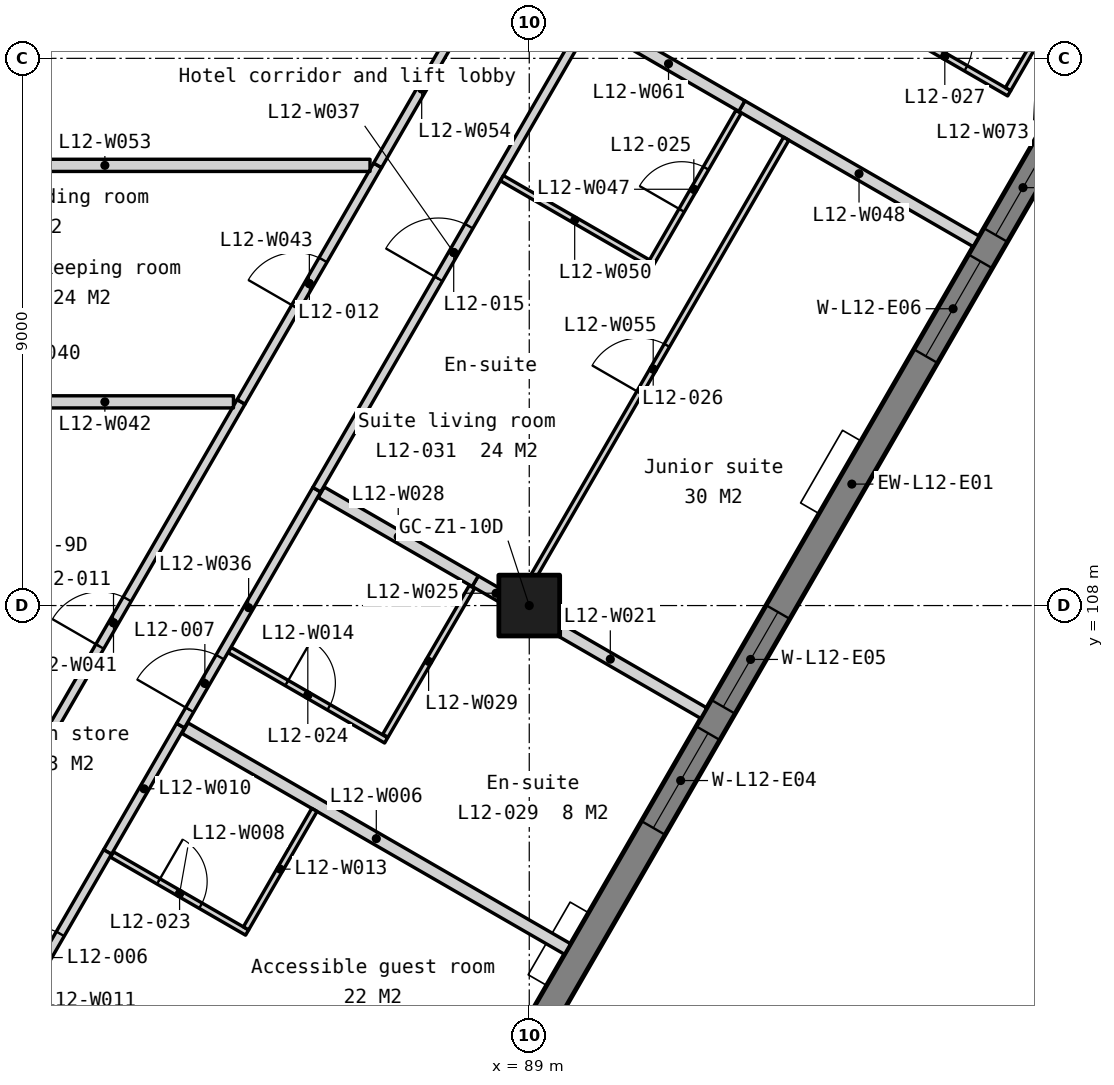
"""IFC4 building model, lengths in metres.
Left out: names, types, materials, properties, quantities, classifications, styles, units other than length and angle.
Written with IfcOpenShell. Run it as: python <this file> out.ifc"""

import sys

from ifc_helpers import new_model, si_unit, direction, frame, frame_2d, origin, origin_2d, place, context, subcontext, project, spatial, polyline, rectangle, outline, extrude, element, fill, save


model = new_model("IFC4")
c1 = context("Model", 3, precision=1e-05, world=origin(), true_north=direction((0.0, 1.0)))
c2 = subcontext(c1, "Body", "Model", "MODEL_VIEW")
j1 = project(units=[si_unit("LENGTHUNIT", "METRE"), si_unit("PLANEANGLEUNIT", "RADIAN")], contexts=[c1])
p1 = place(None, origin())
s1 = spatial("IfcSite", under=j1, at=p1, CompositionType="ELEMENT")
p2 = place(p1, origin())
s2 = spatial("IfcBuilding", under=s1, at=p2, CompositionType="ELEMENT")
p3 = place(p2, frame((0.0, 0.0, 56.0)))
s3 = spatial("IfcBuildingStorey", under=s2, at=p3, CompositionType="ELEMENT", Elevation=56.0)
p4 = place(p3, frame((89.0, 108.0, 0.0), z_axis=(0.0, 0.0, 1.0), x_axis=(1.0, 0.0, 0.0)))
e1 = element("IfcColumn", 1, at=p4, inside=s3, PredefinedType="COLUMN", context=c2, shape_type="SweptSolid", body=[
    extrude(rectangle(XDim=1.0, YDim=1.0, at=origin_2d()), origin(), (0.0, 0.0, 1.0), 3.5),
])
p5 = place(p3, frame((83.105, 90.599, -0.15), z_axis=(0.0, 0.0, 1.0), x_axis=(0.499999201451, 0.866025864826, 0.0)))
e2 = element("IfcWall", 2, at=p5, inside=s3, PredefinedType="SOLIDWALL", context=c2, shape_type="SweptSolid", body=[
    extrude(outline(polyline([(44.8, 0.0), (44.8, 3.5), (0.0, 3.5), (0.0, 0.0), (44.8, 0.0)])), frame((0.0, 0.225, 0.0), z_axis=(0.0, -1.0, 0.0), x_axis=(1.0, 0.0, 0.0)), (0.0, 0.0, 1.0), 0.45),
])
p6 = place(p5, frame((0.786, 0.0, 1.05)))
e3 = element("IfcOpeningElement", 3, at=p6, cuts=e2, PredefinedType="OPENING", context=c2, shape_type="SweptSolid", body=[
    extrude(rectangle(XDim=1.2, YDim=1.5, at=frame_2d((0.6, 0.75))), frame((0.0, 0.235, 0.0), z_axis=(0.0, -1.0, 0.0), x_axis=(1.0, 0.0, 0.0)), (0.0, 0.0, 1.0), 0.47),
])
p7 = place(p5, frame((6.91, 0.0, 1.05)))
e4 = element("IfcOpeningElement", 4, at=p7, cuts=e2, PredefinedType="OPENING", context=c2, shape_type="SweptSolid", body=[
    extrude(rectangle(XDim=1.8, YDim=1.5, at=frame_2d((0.9, 0.75))), frame((0.0, 0.235, 0.0), z_axis=(0.0, -1.0, 0.0), x_axis=(1.0, 0.0, 0.0)), (0.0, 0.0, 1.0), 0.47),
])
p8 = place(p5, frame((9.21, 0.0, 1.05)))
e5 = element("IfcOpeningElement", 5, at=p8, cuts=e2, PredefinedType="OPENING", context=c2, shape_type="SweptSolid", body=[
    extrude(rectangle(XDim=1.8, YDim=1.5, at=frame_2d((0.9, 0.75))), frame((0.0, 0.235, 0.0), z_axis=(0.0, -1.0, 0.0), x_axis=(1.0, 0.0, 0.0)), (0.0, 0.0, 1.0), 0.47),
])
p9 = place(p5, frame((15.87, 0.0, 1.05)))
e6 = element("IfcOpeningElement", 6, at=p9, cuts=e2, PredefinedType="OPENING", context=c2, shape_type="SweptSolid", body=[
    extrude(rectangle(XDim=1.8, YDim=1.5, at=frame_2d((0.9, 0.75))), frame((0.0, 0.235, 0.0), z_axis=(0.0, -1.0, 0.0), x_axis=(1.0, 0.0, 0.0)), (0.0, 0.0, 1.0), 0.47),
])
p10 = place(p5, frame((18.17, 0.0, 1.05)))
e7 = element("IfcOpeningElement", 7, at=p10, cuts=e2, PredefinedType="OPENING", context=c2, shape_type="SweptSolid", body=[
    extrude(rectangle(XDim=1.8, YDim=1.5, at=frame_2d((0.9, 0.75))), frame((0.0, 0.235, 0.0), z_axis=(0.0, -1.0, 0.0), x_axis=(1.0, 0.0, 0.0)), (0.0, 0.0, 1.0), 0.47),
])
p11 = place(p5, frame((24.83, 0.0, 1.05)))
e8 = element("IfcOpeningElement", 8, at=p11, cuts=e2, PredefinedType="OPENING", context=c2, shape_type="SweptSolid", body=[
    extrude(rectangle(XDim=1.8, YDim=1.5, at=frame_2d((0.9, 0.75))), frame((0.0, 0.235, 0.0), z_axis=(0.0, -1.0, 0.0), x_axis=(1.0, 0.0, 0.0)), (0.0, 0.0, 1.0), 0.47),
])
p12 = place(p5, frame((27.13, 0.0, 1.05)))
e9 = element("IfcOpeningElement", 9, at=p12, cuts=e2, PredefinedType="OPENING", context=c2, shape_type="SweptSolid", body=[
    extrude(rectangle(XDim=1.8, YDim=1.5, at=frame_2d((0.9, 0.75))), frame((0.0, 0.235, 0.0), z_axis=(0.0, -1.0, 0.0), x_axis=(1.0, 0.0, 0.0)), (0.0, 0.0, 1.0), 0.47),
])
p13 = place(p5, frame((33.79, 0.0, 1.05)))
e10 = element("IfcOpeningElement", 10, at=p13, cuts=e2, PredefinedType="OPENING", context=c2, shape_type="SweptSolid", body=[
    extrude(rectangle(XDim=1.8, YDim=1.5, at=frame_2d((0.9, 0.75))), frame((0.0, 0.235, 0.0), z_axis=(0.0, -1.0, 0.0), x_axis=(1.0, 0.0, 0.0)), (0.0, 0.0, 1.0), 0.47),
])
p14 = place(p5, frame((36.09, 0.0, 1.05)))
e11 = element("IfcOpeningElement", 11, at=p14, cuts=e2, PredefinedType="OPENING", context=c2, shape_type="SweptSolid", body=[
    extrude(rectangle(XDim=1.8, YDim=1.5, at=frame_2d((0.9, 0.75))), frame((0.0, 0.235, 0.0), z_axis=(0.0, -1.0, 0.0), x_axis=(1.0, 0.0, 0.0)), (0.0, 0.0, 1.0), 0.47),
])
p15 = place(p5, frame((42.814, 0.0, 1.05)))
e12 = element("IfcOpeningElement", 12, at=p15, cuts=e2, PredefinedType="OPENING", context=c2, shape_type="SweptSolid", body=[
    extrude(rectangle(XDim=1.2, YDim=1.5, at=frame_2d((0.6, 0.75))), frame((0.0, 0.235, 0.0), z_axis=(0.0, -1.0, 0.0), x_axis=(1.0, 0.0, 0.0)), (0.0, 0.0, 1.0), 0.47),
])
p16 = place(p3, frame((83.339, 105.983, 0.0), z_axis=(0.0, 0.0, 1.0), x_axis=(0.866023858256, -0.500002676924, 0.0)))
e13 = element("IfcWall", 13, at=p16, inside=s3, PredefinedType="PARTITIONING", context=c2, shape_type="SweptSolid", body=[
    extrude(rectangle(XDim=7.265, YDim=0.2, at=frame_2d((3.633, 0.0))), origin(), (0.0, 0.0, 1.0), 3.35),
])
p17 = place(p3, frame((82.139, 103.905, 0.0), z_axis=(0.0, 0.0, 1.0), x_axis=(0.866014388206, -0.500019079056, 0.0)))
e14 = element("IfcWall", 14, at=p17, inside=s3, PredefinedType="PARTITIONING", context=c2, shape_type="SweptSolid", body=[
    extrude(rectangle(XDim=2.565, YDim=0.1, at=frame_2d((1.282, 0.0))), origin(), (0.0, 0.0, 1.0), 3.35),
])
p18 = place(p17, frame((0.883, 0.0, 0.0)))
e15 = element("IfcOpeningElement", 15, at=p18, cuts=e14, PredefinedType="OPENING", context=c2, shape_type="SweptSolid", body=[
    extrude(rectangle(XDim=0.8, YDim=2.1, at=frame_2d((0.4, 1.05))), frame((0.0, 0.06, 0.0), z_axis=(0.0, -1.0, 0.0), x_axis=(1.0, 0.0, 0.0)), (0.0, 0.0, 1.0), 0.12),
])
p19 = place(p3, frame((82.065, 103.947, 0.0), z_axis=(0.0, 0.0, 1.0), x_axis=(0.500001309137, 0.866024647952, 0.0)))
e16 = element("IfcWall", 16, at=p19, inside=s3, PredefinedType="PARTITIONING", context=c2, shape_type="SweptSolid", body=[
    extrude(rectangle(XDim=2.4, YDim=0.15, at=frame_2d((1.2, 0.0))), origin(), (0.0, 0.0, 1.0), 3.35),
])
p20 = place(p3, frame((80.06, 100.474, 0.0), z_axis=(0.0, 0.0, 1.0), x_axis=(0.499963124258, 0.866046692957, 0.0)))
e17 = element("IfcWall", 17, at=p20, inside=s3, PredefinedType="PARTITIONING", context=c2, shape_type="SweptSolid", body=[
    extrude(rectangle(XDim=4.01, YDim=0.15, at=frame_2d((2.005, 0.0))), origin(), (0.0, 0.0, 1.0), 3.35),
])
p21 = place(p20, frame((1.555, 0.0, 0.0)))
e18 = element("IfcOpeningElement", 18, at=p21, cuts=e17, PredefinedType="OPENING", context=c2, shape_type="SweptSolid", body=[
    extrude(rectangle(XDim=0.9, YDim=2.1, at=frame_2d((0.45, 1.05))), frame((0.0, 0.085, 0.0), z_axis=(0.0, -1.0, 0.0), x_axis=(1.0, 0.0, 0.0)), (0.0, 0.0, 1.0), 0.17),
])
p22 = place(p3, frame((84.342, 102.69, 0.0), z_axis=(0.0, 0.0, 1.0), x_axis=(0.499966648284, 0.866044658551, 0.0)))
e19 = element("IfcWall", 19, at=p22, inside=s3, PredefinedType="PARTITIONING", context=c2, shape_type="SweptSolid", body=[
    extrude(rectangle(XDim=2.25, YDim=0.1, at=frame_2d((1.125, 0.0))), origin(), (0.0, 0.0, 1.0), 3.35),
])
p23 = place(p3, frame((84.07, 107.27, 0.0), z_axis=(0.0, 0.0, 1.0), x_axis=(0.866053027861, -0.499952150643, 0.0)))
e20 = element("IfcWall", 20, at=p23, inside=s3, PredefinedType="PARTITIONING", context=c2, shape_type="SweptSolid", body=[
    extrude(rectangle(XDim=2.975, YDim=0.1, at=frame_2d((1.487, 0.0))), origin(), (0.0, 0.0, 1.0), 3.35),
])
p24 = place(p23, frame((1.087, 0.0, 0.0)))
e21 = element("IfcOpeningElement", 21, at=p24, cuts=e20, PredefinedType="OPENING", context=c2, shape_type="SweptSolid", body=[
    extrude(rectangle(XDim=0.8, YDim=2.1, at=frame_2d((0.4, 1.05))), frame((0.0, 0.06, 0.0), z_axis=(0.0, -1.0, 0.0), x_axis=(1.0, 0.0, 0.0)), (0.0, 0.0, 1.0), 0.12),
])
p25 = place(p3, frame((88.796, 108.005, 0.0), z_axis=(0.0, 0.0, 1.0), x_axis=(0.8660424351, -0.499970499736, 0.0)))
e22 = element("IfcWall", 22, at=p25, inside=s3, PredefinedType="PARTITIONING", context=c2, shape_type="SweptSolid", body=[
    extrude(rectangle(XDim=3.55, YDim=0.2, at=frame_2d((1.775, 0.0))), origin(), (0.0, 0.0, 1.0), 3.35),
])
p26 = place(p3, frame((88.112, 108.4, 0.0), z_axis=(0.0, 0.0, 1.0), x_axis=(0.865989998118, -0.500061319399, 0.0)))
e23 = element("IfcWall", 23, at=p26, inside=s3, PredefinedType="PARTITIONING", context=c2, shape_type="SweptSolid", body=[
    extrude(rectangle(XDim=0.79, YDim=0.2, at=frame_2d((0.395, 0.0))), origin(), (0.0, 0.0, 1.0), 3.35),
])
p27 = place(p3, frame((85.579, 109.863, 0.0), z_axis=(0.0, 0.0, 1.0), x_axis=(0.86601045545, -0.500025890382, 0.0)))
e24 = element("IfcWall", 24, at=p27, inside=s3, PredefinedType="PARTITIONING", context=c2, shape_type="SweptSolid", body=[
    extrude(rectangle(XDim=2.925, YDim=0.2, at=frame_2d((1.462, 0.0))), origin(), (0.0, 0.0, 1.0), 3.35),
])
p28 = place(p3, frame((86.633, 105.859, 0.0), z_axis=(0.0, 0.0, 1.0), x_axis=(0.502878343763, 0.864357201263, 0.0)))
e25 = element("IfcWall", 25, at=p28, inside=s3, PredefinedType="PARTITIONING", context=c2, shape_type="SweptSolid", body=[
    extrude(rectangle(XDim=2.83, YDim=0.1, at=frame_2d((1.415, 0.0))), origin(), (0.0, 0.0, 1.0), 3.35),
])
p29 = place(p3, frame((83.265, 106.026, 0.0), z_axis=(0.0, 0.0, 1.0), x_axis=(0.499989762656, 0.866031314237, 0.0)))
e26 = element("IfcWall", 26, at=p29, inside=s3, PredefinedType="PARTITIONING", context=c2, shape_type="SweptSolid", body=[
    extrude(rectangle(XDim=4.48, YDim=0.15, at=frame_2d((2.24, 0.0))), origin(), (0.0, 0.0, 1.0), 3.35),
])
p30 = place(p29, frame((0.3, 0.0, 0.0)))
e27 = element("IfcOpeningElement", 27, at=p30, cuts=e26, PredefinedType="OPENING", context=c2, shape_type="SweptSolid", body=[
    extrude(rectangle(XDim=1.0, YDim=2.1, at=frame_2d((0.5, 1.05))), frame((0.0, 0.085, 0.0), z_axis=(0.0, -1.0, 0.0), x_axis=(1.0, 0.0, 0.0)), (0.0, 0.0, 1.0), 0.17),
])
p31 = place(p3, frame((85.505, 109.906, 0.0), z_axis=(0.0, 0.0, 1.0), x_axis=(0.500017993482, 0.866015014994, 0.0)))
e28 = element("IfcWall", 28, at=p31, inside=s3, PredefinedType="PARTITIONING", context=c2, shape_type="SweptSolid", body=[
    extrude(rectangle(XDim=9.01, YDim=0.15, at=frame_2d((4.505, 0.0))), origin(), (0.0, 0.0, 1.0), 3.35),
])
p32 = place(p31, frame((4.005, 0.0, 0.0)))
e29 = element("IfcOpeningElement", 29, at=p32, cuts=e28, PredefinedType="OPENING", context=c2, shape_type="SweptSolid", body=[
    extrude(rectangle(XDim=1.0, YDim=2.1, at=frame_2d((0.5, 1.05))), frame((0.0, 0.085, 0.0), z_axis=(0.0, -1.0, 0.0), x_axis=(1.0, 0.0, 0.0)), (0.0, 0.0, 1.0), 0.17),
])
p33 = place(p3, frame((80.065, 104.083, 0.0), z_axis=(0.0, 0.0, 1.0), x_axis=(0.49999109456, 0.866030545282, 0.0)))
e30 = element("IfcWall", 30, at=p33, inside=s3, PredefinedType="PARTITIONING", context=c2, shape_type="SweptSolid", body=[
    extrude(rectangle(XDim=8.391, YDim=0.15, at=frame_2d((4.196, 0.0))), origin(), (0.0, 0.0, 1.0), 3.35),
])
p34 = place(p33, frame((3.746, 0.0, 0.0)))
e31 = element("IfcOpeningElement", 31, at=p34, cuts=e30, PredefinedType="OPENING", context=c2, shape_type="SweptSolid", body=[
    extrude(rectangle(XDim=0.9, YDim=2.1, at=frame_2d((0.45, 1.05))), frame((0.0, 0.085, 0.0), z_axis=(0.0, -1.0, 0.0), x_axis=(1.0, 0.0, 0.0)), (0.0, 0.0, 1.0), 0.17),
])
p35 = place(p3, frame((79.906, 111.35, 0.0), z_axis=(0.0, 0.0, 1.0), x_axis=(1.0, 0.0, 0.0)))
e32 = element("IfcWall", 32, at=p35, inside=s3, PredefinedType="PARTITIONING", context=c2, shape_type="SweptSolid", body=[
    extrude(rectangle(XDim=4.229, YDim=0.2, at=frame_2d((2.115, 0.0))), origin(), (0.0, 0.0, 1.0), 3.35),
])
p36 = place(p3, frame((84.26, 111.35, 0.0), z_axis=(0.0, 0.0, 1.0), x_axis=(0.500003186274, 0.866023564181, 0.0)))
e33 = element("IfcWall", 33, at=p36, inside=s3, PredefinedType="PARTITIONING", context=c2, shape_type="SweptSolid", body=[
    extrude(rectangle(XDim=4.492, YDim=0.15, at=frame_2d((2.246, 0.0))), origin(), (0.0, 0.0, 1.0), 3.35),
])
p37 = place(p36, frame((1.796, 0.0, 0.0)))
e34 = element("IfcOpeningElement", 34, at=p37, cuts=e33, PredefinedType="OPENING", context=c2, shape_type="SweptSolid", body=[
    extrude(rectangle(XDim=0.9, YDim=2.1, at=frame_2d((0.45, 1.05))), frame((0.0, 0.085, 0.0), z_axis=(0.0, -1.0, 0.0), x_axis=(1.0, 0.0, 0.0)), (0.0, 0.0, 1.0), 0.17),
])
p38 = place(p3, frame((90.971, 113.574, 0.0), z_axis=(0.0, 0.0, 1.0), x_axis=(0.499988418424, 0.866032090307, 0.0)))
e35 = element("IfcWall", 35, at=p38, inside=s3, PredefinedType="PARTITIONING", context=c2, shape_type="SweptSolid", body=[
    extrude(rectangle(XDim=2.94, YDim=0.1, at=frame_2d((1.47, 0.0))), origin(), (0.0, 0.0, 1.0), 3.35),
])
p39 = place(p38, frame((1.07, 0.0, 0.0)))
e36 = element("IfcOpeningElement", 36, at=p39, cuts=e35, PredefinedType="OPENING", context=c2, shape_type="SweptSolid", body=[
    extrude(rectangle(XDim=0.8, YDim=2.1, at=frame_2d((0.4, 1.05))), frame((0.0, 0.06, 0.0), z_axis=(0.0, -1.0, 0.0), x_axis=(1.0, 0.0, 0.0)), (0.0, 0.0, 1.0), 0.12),
])
p40 = place(p3, frame((92.497, 116.215, 0.0), z_axis=(0.0, 0.0, 1.0), x_axis=(0.866012907634, -0.500021643343, 0.0)))
e37 = element("IfcWall", 37, at=p40, inside=s3, PredefinedType="PARTITIONING", context=c2, shape_type="SweptSolid", body=[
    extrude(rectangle(XDim=4.45, YDim=0.2, at=frame_2d((2.225, 0.0))), origin(), (0.0, 0.0, 1.0), 3.35),
])
p41 = place(p3, frame((88.55, 115.03, 0.0), z_axis=(0.0, 0.0, 1.0), x_axis=(0.866012076814, -0.50002308228, 0.0)))
e38 = element("IfcWall", 38, at=p41, inside=s3, PredefinedType="PARTITIONING", context=c2, shape_type="SweptSolid", body=[
    extrude(rectangle(XDim=2.765, YDim=0.1, at=frame_2d((1.382, 0.0))), origin(), (0.0, 0.0, 1.0), 3.35),
])
p42 = place(p3, frame((77.66, 115.24, 0.0), z_axis=(0.0, 0.0, 1.0), x_axis=(1.0, 0.0, 0.0)))
e39 = element("IfcWall", 39, at=p42, inside=s3, PredefinedType="PARTITIONING", context=c2, shape_type="SweptSolid", body=[
    extrude(rectangle(XDim=8.721, YDim=0.2, at=frame_2d((4.361, 0.0))), origin(), (0.0, 0.0, 1.0), 3.35),
])
p43 = place(p3, frame((86.506, 115.24, 0.0), z_axis=(0.0, 0.0, 1.0), x_axis=(0.500016544581, 0.866015851556, 0.0)))
e40 = element("IfcWall", 40, at=p43, inside=s3, PredefinedType="PARTITIONING", context=c2, shape_type="SweptSolid", body=[
    extrude(rectangle(XDim=2.898, YDim=0.15, at=frame_2d((1.449, 0.0))), origin(), (0.0, 0.0, 1.0), 3.35),
])
p44 = place(p3, frame((88.851, 108.101, 0.0), z_axis=(0.0, 0.0, 1.0), x_axis=(0.500004234368, 0.866022959057, 0.0)))
e41 = element("IfcWall", 41, at=p44, inside=s3, PredefinedType="PARTITIONING", context=c2, shape_type="SweptSolid", body=[
    extrude(rectangle(XDim=8.75, YDim=0.1, at=frame_2d((4.375, 0.0))), origin(), (0.0, 0.0, 1.0), 3.35),
])
p45 = place(p44, frame((3.925, 0.0, 0.0)))
e42 = element("IfcOpeningElement", 42, at=p45, cuts=e41, PredefinedType="OPENING", context=c2, shape_type="SweptSolid", body=[
    extrude(rectangle(XDim=0.9, YDim=2.1, at=frame_2d((0.45, 1.05))), frame((0.0, 0.06, 0.0), z_axis=(0.0, -1.0, 0.0), x_axis=(1.0, 0.0, 0.0)), (0.0, 0.0, 1.0), 0.12),
])
p46 = place(p3, frame((94.775, 117.647, 0.0), z_axis=(0.0, 0.0, 1.0), x_axis=(0.86604092097, -0.499973122483, 0.0)))
e43 = element("IfcWall", 43, at=p46, inside=s3, PredefinedType="PARTITIONING", context=c2, shape_type="SweptSolid", body=[
    extrude(rectangle(XDim=2.445, YDim=0.1, at=frame_2d((1.223, 0.0))), origin(), (0.0, 0.0, 1.0), 3.35),
])
p47 = place(p46, frame((0.823, 0.0, 0.0)))
e44 = element("IfcOpeningElement", 44, at=p47, cuts=e43, PredefinedType="OPENING", context=c2, shape_type="SweptSolid", body=[
    extrude(rectangle(XDim=0.8, YDim=2.1, at=frame_2d((0.4, 1.05))), frame((0.0, 0.06, 0.0), z_axis=(0.0, -1.0, 0.0), x_axis=(1.0, 0.0, 0.0)), (0.0, 0.0, 1.0), 0.12),
])
p48 = place(p3, frame((90.085, 117.608, 0.0), z_axis=(0.0, 0.0, 1.0), x_axis=(0.866011863948, -0.500023450952, 0.0)))
e45 = element("IfcWall", 45, at=p48, inside=s3, PredefinedType="PARTITIONING", context=c2, shape_type="SweptSolid", body=[
    extrude(rectangle(XDim=2.785, YDim=0.2, at=frame_2d((1.393, 0.0))), origin(), (0.0, 0.0, 1.0), 3.35),
])
p49 = place(p3, frame((96.875, 116.493, 0.0), z_axis=(0.0, 0.0, 1.0), x_axis=(0.500043961785, 0.866000020948, 0.0)))
e46 = element("IfcWall", 46, at=p49, inside=s3, PredefinedType="PARTITIONING", context=c2, shape_type="SweptSolid", body=[
    extrude(rectangle(XDim=1.95, YDim=0.1, at=frame_2d((0.975, 0.0))), origin(), (0.0, 0.0, 1.0), 3.35),
])
p50 = place(p9, origin())
e47 = element("IfcWindow", 47, at=p50, inside=s3, PartitioningType="SINGLE_PANEL", PredefinedType="WINDOW", context=c2, shape_type="SweptSolid", body=[
    extrude(rectangle(XDim=1.8, YDim=1.5, at=frame_2d((0.9, 0.75))), frame((0.0, 0.03, 0.0), z_axis=(0.0, -1.0, 0.0), x_axis=(1.0, 0.0, 0.0)), (0.0, 0.0, 1.0), 0.06),
])
fill(e6, e47)
p51 = place(p10, origin())
e48 = element("IfcWindow", 48, at=p51, inside=s3, PartitioningType="SINGLE_PANEL", PredefinedType="WINDOW", context=c2, shape_type="SweptSolid", body=[
    extrude(rectangle(XDim=1.8, YDim=1.5, at=frame_2d((0.9, 0.75))), frame((0.0, 0.03, 0.0), z_axis=(0.0, -1.0, 0.0), x_axis=(1.0, 0.0, 0.0)), (0.0, 0.0, 1.0), 0.06),
])
fill(e7, e48)
p52 = place(p11, origin())
e49 = element("IfcWindow", 49, at=p52, inside=s3, PartitioningType="SINGLE_PANEL", PredefinedType="WINDOW", context=c2, shape_type="SweptSolid", body=[
    extrude(rectangle(XDim=1.8, YDim=1.5, at=frame_2d((0.9, 0.75))), frame((0.0, 0.03, 0.0), z_axis=(0.0, -1.0, 0.0), x_axis=(1.0, 0.0, 0.0)), (0.0, 0.0, 1.0), 0.06),
])
fill(e8, e49)
p53 = place(p12, origin())
e50 = element("IfcWindow", 50, at=p53, inside=s3, PartitioningType="SINGLE_PANEL", PredefinedType="WINDOW", context=c2, shape_type="SweptSolid", body=[
    extrude(rectangle(XDim=1.8, YDim=1.5, at=frame_2d((0.9, 0.75))), frame((0.0, 0.03, 0.0), z_axis=(0.0, -1.0, 0.0), x_axis=(1.0, 0.0, 0.0)), (0.0, 0.0, 1.0), 0.06),
])
fill(e9, e50)
p54 = place(p21, origin())
e51 = element("IfcDoor", 51, at=p54, inside=s3, OperationType="SINGLE_SWING_LEFT", PredefinedType="DOOR", context=c2, shape_type="SweptSolid", body=[
    extrude(rectangle(XDim=0.9, YDim=2.1, at=frame_2d((0.45, 1.05))), frame((0.0, 0.025, 0.0), z_axis=(0.0, -1.0, 0.0), x_axis=(1.0, 0.0, 0.0)), (0.0, 0.0, 1.0), 0.05),
])
fill(e18, e51)
p55 = place(p30, origin())
e52 = element("IfcDoor", 52, at=p55, inside=s3, OperationType="SINGLE_SWING_LEFT", PredefinedType="DOOR", context=c2, shape_type="SweptSolid", body=[
    extrude(rectangle(XDim=1.0, YDim=2.1, at=frame_2d((0.5, 1.05))), frame((0.0, 0.025, 0.0), z_axis=(0.0, -1.0, 0.0), x_axis=(1.0, 0.0, 0.0)), (0.0, 0.0, 1.0), 0.05),
])
fill(e27, e52)
p56 = place(p34, origin())
e53 = element("IfcDoor", 53, at=p56, inside=s3, OperationType="SINGLE_SWING_LEFT", PredefinedType="DOOR", context=c2, shape_type="SweptSolid", body=[
    extrude(rectangle(XDim=0.9, YDim=2.1, at=frame_2d((0.45, 1.05))), frame((0.0, 0.025, 0.0), z_axis=(0.0, -1.0, 0.0), x_axis=(1.0, 0.0, 0.0)), (0.0, 0.0, 1.0), 0.05),
])
fill(e31, e53)
p57 = place(p37, origin())
e54 = element("IfcDoor", 54, at=p57, inside=s3, OperationType="SINGLE_SWING_LEFT", PredefinedType="DOOR", context=c2, shape_type="SweptSolid", body=[
    extrude(rectangle(XDim=0.9, YDim=2.1, at=frame_2d((0.45, 1.05))), frame((0.0, 0.025, 0.0), z_axis=(0.0, -1.0, 0.0), x_axis=(1.0, 0.0, 0.0)), (0.0, 0.0, 1.0), 0.05),
])
fill(e34, e54)
p58 = place(p32, origin())
e55 = element("IfcDoor", 55, at=p58, inside=s3, OperationType="SINGLE_SWING_LEFT", PredefinedType="DOOR", context=c2, shape_type="SweptSolid", body=[
    extrude(rectangle(XDim=1.0, YDim=2.1, at=frame_2d((0.5, 1.05))), frame((0.0, 0.025, 0.0), z_axis=(0.0, -1.0, 0.0), x_axis=(1.0, 0.0, 0.0)), (0.0, 0.0, 1.0), 0.05),
])
fill(e29, e55)
p59 = place(p18, origin())
e56 = element("IfcDoor", 56, at=p59, inside=s3, OperationType="SINGLE_SWING_LEFT", PredefinedType="DOOR", context=c2, shape_type="SweptSolid", body=[
    extrude(rectangle(XDim=0.8, YDim=2.1, at=frame_2d((0.4, 1.05))), frame((0.0, 0.025, 0.0), z_axis=(0.0, -1.0, 0.0), x_axis=(1.0, 0.0, 0.0)), (0.0, 0.0, 1.0), 0.05),
])
fill(e15, e56)
p60 = place(p24, origin())
e57 = element("IfcDoor", 57, at=p60, inside=s3, OperationType="SINGLE_SWING_LEFT", PredefinedType="DOOR", context=c2, shape_type="SweptSolid", body=[
    extrude(rectangle(XDim=0.8, YDim=2.1, at=frame_2d((0.4, 1.05))), frame((0.0, 0.025, 0.0), z_axis=(0.0, -1.0, 0.0), x_axis=(1.0, 0.0, 0.0)), (0.0, 0.0, 1.0), 0.05),
])
fill(e21, e57)
p61 = place(p39, origin())
e58 = element("IfcDoor", 58, at=p61, inside=s3, OperationType="SINGLE_SWING_LEFT", PredefinedType="DOOR", context=c2, shape_type="SweptSolid", body=[
    extrude(rectangle(XDim=0.8, YDim=2.1, at=frame_2d((0.4, 1.05))), frame((0.0, 0.025, 0.0), z_axis=(0.0, -1.0, 0.0), x_axis=(1.0, 0.0, 0.0)), (0.0, 0.0, 1.0), 0.05),
])
fill(e36, e58)
p62 = place(p45, origin())
e59 = element("IfcDoor", 59, at=p62, inside=s3, OperationType="SINGLE_SWING_LEFT", PredefinedType="DOOR", context=c2, shape_type="SweptSolid", body=[
    extrude(rectangle(XDim=0.9, YDim=2.1, at=frame_2d((0.45, 1.05))), frame((0.0, 0.025, 0.0), z_axis=(0.0, -1.0, 0.0), x_axis=(1.0, 0.0, 0.0)), (0.0, 0.0, 1.0), 0.05),
])
fill(e42, e59)
p63 = place(p47, origin())
e60 = element("IfcDoor", 60, at=p63, inside=s3, OperationType="SINGLE_SWING_LEFT", PredefinedType="DOOR", context=c2, shape_type="SweptSolid", body=[
    extrude(rectangle(XDim=0.8, YDim=2.1, at=frame_2d((0.4, 1.05))), frame((0.0, 0.025, 0.0), z_axis=(0.0, -1.0, 0.0), x_axis=(1.0, 0.0, 0.0)), (0.0, 0.0, 1.0), 0.05),
])
fill(e44, e60)
save(model, sys.argv[1])
